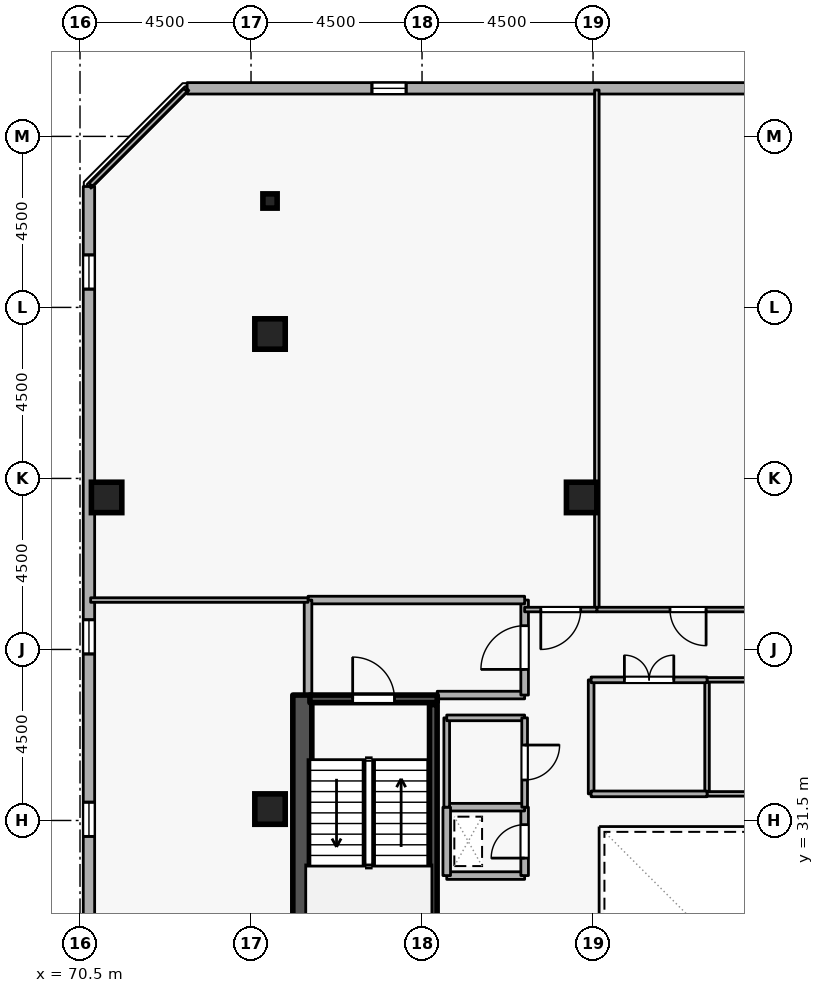
"""IFC4 building model, lengths in metres.
Left out: names, types, materials, properties, quantities, classifications, styles, units other than length and angle.
Written with IfcOpenShell. Run it as: python <this file> out.ifc"""

import sys

from ifc_helpers import new_model, si_unit, direction, frame, frame_2d, origin, origin_2d, place, context, subcontext, project, spatial, rectangle, i_section, extrude, element, fill, save


model = new_model("IFC4")
c1 = context("Model", 3, precision=1e-05, world=origin(), true_north=direction((0.0, 1.0)))
c2 = subcontext(c1, "Body", "Model", "MODEL_VIEW")
j1 = project(units=[si_unit("LENGTHUNIT", "METRE"), si_unit("PLANEANGLEUNIT", "RADIAN")], contexts=[c1])
p1 = place(None, origin())
s1 = spatial("IfcSite", under=j1, at=p1, CompositionType="ELEMENT")
p2 = place(p1, origin())
s2 = spatial("IfcBuilding", under=s1, at=p2, CompositionType="ELEMENT")
p3 = place(p2, frame((0.0, 0.0, 276.3)))
s3 = spatial("IfcBuildingStorey", under=s2, at=p3, CompositionType="ELEMENT", Elevation=276.3)
p4 = place(p3, frame((76.35, 19.2, 0.0), z_axis=(0.0, 0.0, 1.0), x_axis=(0.0, 1.0, 0.0)))
e1 = element("IfcWall", 1, at=p4, inside=s3, PredefinedType="SHEAR", context=c2, shape_type="SweptSolid", body=[
    extrude(rectangle(XDim=15.6, YDim=0.5, at=frame_2d((7.8, 0.0))), origin(), (0.0, 0.0, 1.0), 3.6),
])
for number, where, z_axis, x_axis in (
    (2, (75.5, 44.3, 0.0), (0.0, 0.0, 1.0), (1.0, 0.0, 0.0)),
    (3, (71.2, 40.0, 0.0), (0.0, 0.0, 1.0), (1.0, 0.0, 0.0)),
    (4, (83.7, 40.0, 0.0), (0.0, 0.0, 1.0), (1.0, 0.0, 0.0)),
    (5, (75.5, 31.8, 0.0), (0.0, 0.0, 1.0), (1.0, 0.0, 0.0)),
):
    element("IfcColumn", number, at=place(p3, frame(where, z_axis=z_axis, x_axis=x_axis)), inside=s3, PredefinedType="COLUMN", context=c2, shape_type="SweptSolid", body=[
        extrude(rectangle(XDim=0.8, YDim=0.8, at=origin_2d()), origin(), (0.0, 0.0, 1.0), 3.6),
    ])
p5 = place(p3, frame((75.5, 47.8, 0.0), z_axis=(0.0, 0.0, 1.0), x_axis=(1.0, 0.0, 0.0)))
e6 = element("IfcColumn", 6, at=p5, inside=s3, PredefinedType="COLUMN", context=c2, shape_type="SweptSolid", body=[
    extrude(i_section(OverallWidth=0.375, OverallDepth=0.375, WebThickness=0.017, FlangeThickness=0.027, FilletRadius=0.015, at=origin_2d()), origin(), (0.0, 0.0, 1.0), 3.6),
])
p6 = place(p3, frame((109.681, 50.765, 0.0), z_axis=(0.0, 0.0, 1.0), x_axis=(-1.0, 0.0, 0.0)))
e7 = element("IfcWall", 7, at=p6, inside=s3, PredefinedType="STANDARD", context=c2, shape_type="SweptSolid", body=[
    extrude(rectangle(XDim=36.363, YDim=0.3, at=frame_2d((18.181, 0.0))), origin(), (0.0, 0.0, 1.0), 2.66),
])
p7 = place(p6, frame((1.8, 0.0, 0.72)))
e8 = element("IfcOpeningElement", 8, at=p7, cuts=e7, PredefinedType="OPENING", context=c2, shape_type="SweptSolid", body=[
    extrude(rectangle(XDim=0.9, YDim=1.75, at=frame_2d((0.45, 0.875))), frame((0.0, 0.16, 0.0), z_axis=(0.0, -1.0, 0.0), x_axis=(1.0, 0.0, 0.0)), (0.0, 0.0, 1.0), 0.32),
])
p8 = place(p6, frame((6.6, 0.0, 0.72)))
e9 = element("IfcOpeningElement", 9, at=p8, cuts=e7, PredefinedType="OPENING", context=c2, shape_type="SweptSolid", body=[
    extrude(rectangle(XDim=0.9, YDim=1.75, at=frame_2d((0.45, 0.875))), frame((0.0, 0.16, 0.0), z_axis=(0.0, -1.0, 0.0), x_axis=(1.0, 0.0, 0.0)), (0.0, 0.0, 1.0), 0.32),
])
p9 = place(p6, frame((11.4, 0.0, 0.72)))
e10 = element("IfcOpeningElement", 10, at=p9, cuts=e7, PredefinedType="OPENING", context=c2, shape_type="SweptSolid", body=[
    extrude(rectangle(XDim=0.9, YDim=1.75, at=frame_2d((0.45, 0.875))), frame((0.0, 0.16, 0.0), z_axis=(0.0, -1.0, 0.0), x_axis=(1.0, 0.0, 0.0)), (0.0, 0.0, 1.0), 0.32),
])
p10 = place(p6, frame((16.2, 0.0, 0.72)))
e11 = element("IfcOpeningElement", 11, at=p10, cuts=e7, PredefinedType="OPENING", context=c2, shape_type="SweptSolid", body=[
    extrude(rectangle(XDim=0.9, YDim=1.75, at=frame_2d((0.45, 0.875))), frame((0.0, 0.16, 0.0), z_axis=(0.0, -1.0, 0.0), x_axis=(1.0, 0.0, 0.0)), (0.0, 0.0, 1.0), 0.32),
])
p11 = place(p6, frame((30.6, 0.0, 0.72)))
e12 = element("IfcOpeningElement", 12, at=p11, cuts=e7, PredefinedType="OPENING", context=c2, shape_type="SweptSolid", body=[
    extrude(rectangle(XDim=0.9, YDim=1.75, at=frame_2d((0.45, 0.875))), frame((0.0, 0.16, 0.0), z_axis=(0.0, -1.0, 0.0), x_axis=(1.0, 0.0, 0.0)), (0.0, 0.0, 1.0), 0.32),
])
p12 = place(p3, frame((70.735, 48.181, 0.0), z_axis=(0.0, 0.0, 1.0), x_axis=(0.0, -1.0, 0.0)))
e13 = element("IfcWall", 13, at=p12, inside=s3, PredefinedType="STANDARD", context=c2, shape_type="SweptSolid", body=[
    extrude(rectangle(XDim=36.363, YDim=0.3, at=frame_2d((18.181, 0.0))), origin(), (0.0, 0.0, 1.0), 2.66),
])
p13 = place(p12, frame((1.8, 0.0, 0.72)))
e14 = element("IfcOpeningElement", 14, at=p13, cuts=e13, PredefinedType="OPENING", context=c2, shape_type="SweptSolid", body=[
    extrude(rectangle(XDim=0.9, YDim=1.75, at=frame_2d((0.45, 0.875))), frame((0.0, 0.16, 0.0), z_axis=(0.0, -1.0, 0.0), x_axis=(1.0, 0.0, 0.0)), (0.0, 0.0, 1.0), 0.32),
])
p14 = place(p12, frame((11.4, 0.0, 0.72)))
e15 = element("IfcOpeningElement", 15, at=p14, cuts=e13, PredefinedType="OPENING", context=c2, shape_type="SweptSolid", body=[
    extrude(rectangle(XDim=0.9, YDim=1.75, at=frame_2d((0.45, 0.875))), frame((0.0, 0.16, 0.0), z_axis=(0.0, -1.0, 0.0), x_axis=(1.0, 0.0, 0.0)), (0.0, 0.0, 1.0), 0.32),
])
p15 = place(p12, frame((16.2, 0.0, 0.72)))
e16 = element("IfcOpeningElement", 16, at=p15, cuts=e13, PredefinedType="OPENING", context=c2, shape_type="SweptSolid", body=[
    extrude(rectangle(XDim=0.9, YDim=1.75, at=frame_2d((0.45, 0.875))), frame((0.0, 0.16, 0.0), z_axis=(0.0, -1.0, 0.0), x_axis=(1.0, 0.0, 0.0)), (0.0, 0.0, 1.0), 0.32),
])
p16 = place(p12, frame((25.8, 0.0, 0.72)))
e17 = element("IfcOpeningElement", 17, at=p16, cuts=e13, PredefinedType="OPENING", context=c2, shape_type="SweptSolid", body=[
    extrude(rectangle(XDim=0.9, YDim=1.75, at=frame_2d((0.45, 0.875))), frame((0.0, 0.16, 0.0), z_axis=(0.0, -1.0, 0.0), x_axis=(1.0, 0.0, 0.0)), (0.0, 0.0, 1.0), 0.32),
])
p17 = place(p3, frame((76.55, 34.7, 0.0), z_axis=(0.0, 0.0, 1.0), x_axis=(1.0, 0.0, 0.0)))
e18 = element("IfcWall", 18, at=p17, inside=s3, PredefinedType="SHEAR", context=c2, shape_type="SweptSolid", body=[
    extrude(rectangle(XDim=3.35, YDim=0.2, at=frame_2d((1.675, 0.0))), origin(), (0.0, 0.0, 1.0), 3.6),
])
p18 = place(p17, frame((1.125, 0.0, 0.0)))
e19 = element("IfcOpeningElement", 19, at=p18, cuts=e18, PredefinedType="OPENING", context=c2, shape_type="SweptSolid", body=[
    extrude(rectangle(XDim=1.1, YDim=2.1, at=frame_2d((0.55, 1.05))), frame((0.0, 0.11, 0.0), z_axis=(0.0, -1.0, 0.0), x_axis=(1.0, 0.0, 0.0)), (0.0, 0.0, 1.0), 0.22),
])
p19 = place(p3, frame((79.797, 27.45, 0.0), z_axis=(0.0, 0.0, 1.0), x_axis=(0.0, 1.0, 0.0)))
e20 = element("IfcWall", 20, at=p19, inside=s3, PredefinedType="SHEAR", context=c2, shape_type="SweptSolid", body=[
    extrude(rectangle(XDim=7.1, YDim=0.2, at=frame_2d((3.55, 0.0))), origin(), (0.0, 0.0, 1.0), 3.6),
])
p20 = place(p3, frame((79.9, 34.8, 0.0), z_axis=(0.0, 0.0, 1.0), x_axis=(1.0, 0.0, 0.0)))
e21 = element("IfcWall", 21, at=p20, inside=s3, PredefinedType="STANDARD", context=c2, shape_type="SweptSolid", body=[
    extrude(rectangle(XDim=2.3, YDim=0.2, at=frame_2d((1.15, 0.0))), origin(), (0.0, 0.0, 1.0), 2.465),
])
p21 = place(p3, frame((82.2, 34.8, 0.0), z_axis=(0.0, 0.0, 1.0), x_axis=(0.0, 1.0, 0.0)))
e22 = element("IfcWall", 22, at=p21, inside=s3, PredefinedType="STANDARD", context=c2, shape_type="SweptSolid", body=[
    extrude(rectangle(XDim=2.5, YDim=0.2, at=frame_2d((1.25, 0.0))), origin(), (0.0, 0.0, 1.0), 3.26),
])
p22 = place(p21, frame((0.675, 0.0, 0.0)))
e23 = element("IfcOpeningElement", 23, at=p22, cuts=e22, PredefinedType="OPENING", context=c2, shape_type="SweptSolid", body=[
    extrude(rectangle(XDim=1.15, YDim=2.1, at=frame_2d((0.575, 1.05))), frame((0.0, 0.11, 0.0), z_axis=(0.0, -1.0, 0.0), x_axis=(1.0, 0.0, 0.0)), (0.0, 0.0, 1.0), 0.22),
])
p23 = place(p3, frame((82.2, 37.3, 0.0), z_axis=(0.0, 0.0, 1.0), x_axis=(-1.0, 0.0, 0.0)))
e24 = element("IfcWall", 24, at=p23, inside=s3, PredefinedType="STANDARD", context=c2, shape_type="SweptSolid", body=[
    extrude(rectangle(XDim=5.7, YDim=0.2, at=frame_2d((2.85, 0.0))), origin(), (0.0, 0.0, 1.0), 3.26),
])
p24 = place(p3, frame((76.5, 37.3, 0.0), z_axis=(0.0, 0.0, 1.0), x_axis=(0.0, -1.0, 0.0)))
e25 = element("IfcWall", 25, at=p24, inside=s3, PredefinedType="STANDARD", context=c2, shape_type="SweptSolid", body=[
    extrude(rectangle(XDim=2.5, YDim=0.2, at=frame_2d((1.25, 0.0))), origin(), (0.0, 0.0, 1.0), 3.26),
])
p25 = place(p3, frame((80.15, 30.05, 0.0), z_axis=(0.0, 0.0, 1.0), x_axis=(1.0, 0.0, 0.0)))
e26 = element("IfcWall", 26, at=p25, inside=s3, PredefinedType="STANDARD", context=c2, shape_type="SweptSolid", body=[
    extrude(rectangle(XDim=2.05, YDim=0.2, at=frame_2d((1.025, 0.0))), origin(), (0.0, 0.0, 1.0), 3.26),
])
p26 = place(p3, frame((82.2, 30.05, 0.0), z_axis=(0.0, 0.0, 1.0), x_axis=(0.0, 1.0, 0.0)))
e27 = element("IfcWall", 27, at=p26, inside=s3, PredefinedType="STANDARD", context=c2, shape_type="SweptSolid", body=[
    extrude(rectangle(XDim=1.8, YDim=0.2, at=frame_2d((0.9, 0.0))), origin(), (0.0, 0.0, 1.0), 3.26),
])
p27 = place(p26, frame((0.46, 0.0, 0.0)))
e28 = element("IfcOpeningElement", 28, at=p27, cuts=e27, PredefinedType="OPENING", context=c2, shape_type="SweptSolid", body=[
    extrude(rectangle(XDim=0.88, YDim=2.04, at=frame_2d((0.44, 1.02))), frame((0.0, 0.11, 0.0), z_axis=(0.0, -1.0, 0.0), x_axis=(1.0, 0.0, 0.0)), (0.0, 0.0, 1.0), 0.22),
])
p28 = place(p3, frame((82.2, 31.85, 0.0), z_axis=(0.0, 0.0, 1.0), x_axis=(-1.0, 0.0, 0.0)))
e29 = element("IfcWall", 29, at=p28, inside=s3, PredefinedType="STANDARD", context=c2, shape_type="SweptSolid", body=[
    extrude(rectangle(XDim=2.05, YDim=0.2, at=frame_2d((1.025, 0.0))), origin(), (0.0, 0.0, 1.0), 3.26),
])
p29 = place(p3, frame((80.15, 31.85, 0.0), z_axis=(0.0, 0.0, 1.0), x_axis=(0.0, -1.0, 0.0)))
e30 = element("IfcWall", 30, at=p29, inside=s3, PredefinedType="STANDARD", context=c2, shape_type="SweptSolid", body=[
    extrude(rectangle(XDim=1.8, YDim=0.2, at=frame_2d((0.9, 0.0))), origin(), (0.0, 0.0, 1.0), 3.26),
])
p30 = place(p3, frame((80.15, 31.85, 0.0), z_axis=(0.0, 0.0, 1.0), x_axis=(0.0, 1.0, 0.0)))
e31 = element("IfcWall", 31, at=p30, inside=s3, PredefinedType="PARTITIONING", context=c2, shape_type="SweptSolid", body=[
    extrude(rectangle(XDim=2.35, YDim=0.15, at=frame_2d((1.175, 0.0))), origin(), (0.0, 0.0, 1.0), 3.26),
])
p31 = place(p3, frame((80.15, 34.2, 0.0), z_axis=(0.0, 0.0, 1.0), x_axis=(1.0, 0.0, 0.0)))
e32 = element("IfcWall", 32, at=p31, inside=s3, PredefinedType="PARTITIONING", context=c2, shape_type="SweptSolid", body=[
    extrude(rectangle(XDim=2.05, YDim=0.15, at=frame_2d((1.025, 0.0))), origin(), (0.0, 0.0, 1.0), 2.465),
])
p32 = place(p3, frame((82.2, 34.2, 0.0), z_axis=(0.0, 0.0, 1.0), x_axis=(0.0, -1.0, 0.0)))
e33 = element("IfcWall", 33, at=p32, inside=s3, PredefinedType="PARTITIONING", context=c2, shape_type="SweptSolid", body=[
    extrude(rectangle(XDim=2.35, YDim=0.15, at=frame_2d((1.175, 0.0))), origin(), (0.0, 0.0, 1.0), 3.26),
])
p33 = place(p32, frame((0.715, 0.0, 0.0)))
e34 = element("IfcOpeningElement", 34, at=p33, cuts=e33, PredefinedType="OPENING", context=c2, shape_type="SweptSolid", body=[
    extrude(rectangle(XDim=0.92, YDim=2.08, at=frame_2d((0.46, 1.04))), frame((0.0, 0.085, 0.0), z_axis=(0.0, -1.0, 0.0), x_axis=(1.0, 0.0, 0.0)), (0.0, 0.0, 1.0), 0.17),
])
p34 = place(p3, frame((84.1, 37.05, 0.0), z_axis=(0.0, 0.0, 1.0), x_axis=(0.0, 1.0, 0.0)))
e35 = element("IfcWall", 35, at=p34, inside=s3, PredefinedType="PARTITIONING", context=c2, shape_type="SweptSolid", body=[
    extrude(rectangle(XDim=13.67, YDim=0.12, at=frame_2d((6.835, 0.0))), origin(), (0.0, 0.0, 1.0), 3.26),
])
p35 = place(p3, frame((88.9, 37.05, 0.0), z_axis=(0.0, 0.0, 1.0), x_axis=(-1.0, 0.0, 0.0)))
e36 = element("IfcWall", 36, at=p35, inside=s3, PredefinedType="PARTITIONING", context=c2, shape_type="SweptSolid", body=[
    extrude(rectangle(XDim=4.8, YDim=0.12, at=frame_2d((2.4, 0.0))), origin(), (0.0, 0.0, 1.0), 3.26),
])
p36 = place(p35, frame((1.925, 0.0, 0.0)))
e37 = element("IfcOpeningElement", 37, at=p36, cuts=e36, PredefinedType="OPENING", context=c2, shape_type="SweptSolid", body=[
    extrude(rectangle(XDim=0.95, YDim=2.1, at=frame_2d((0.475, 1.05))), frame((0.0, 0.07, 0.0), z_axis=(0.0, -1.0, 0.0), x_axis=(1.0, 0.0, 0.0)), (0.0, 0.0, 1.0), 0.14),
])
p37 = place(p3, frame((76.5, 37.3, 0.0), z_axis=(0.0, 0.0, 1.0), x_axis=(-1.0, 0.0, 0.0)))
e38 = element("IfcWall", 38, at=p37, inside=s3, PredefinedType="PARTITIONING", context=c2, shape_type="SweptSolid", body=[
    extrude(rectangle(XDim=5.72, YDim=0.12, at=frame_2d((2.86, 0.0))), origin(), (0.0, 0.0, 1.0), 3.26),
])
p38 = place(p3, frame((70.78, 48.225, 0.0), z_axis=(0.0, 0.0, 1.0), x_axis=(0.707106781187, 0.707106781187, 0.0)))
e39 = element("IfcWall", 39, at=p38, inside=s3, PredefinedType="PARTITIONING", context=c2, shape_type="SweptSolid", body=[
    extrude(rectangle(XDim=3.528, YDim=0.12, at=frame_2d((1.764, 0.0))), origin(), (0.0, 0.0, 1.0), 3.26),
])
p39 = place(p3, frame((84.1, 37.05, 0.0), z_axis=(0.0, 0.0, 1.0), x_axis=(-1.0, 0.0, 0.0)))
e40 = element("IfcWall", 40, at=p39, inside=s3, PredefinedType="PARTITIONING", context=c2, shape_type="SweptSolid", body=[
    extrude(rectangle(XDim=1.9, YDim=0.12, at=frame_2d((0.95, 0.0))), origin(), (0.0, 0.0, 1.0), 3.26),
])
p40 = place(p39, frame((0.425, 0.0, 0.0)))
e41 = element("IfcOpeningElement", 41, at=p40, cuts=e40, PredefinedType="OPENING", context=c2, shape_type="SweptSolid", body=[
    extrude(rectangle(XDim=1.05, YDim=2.1, at=frame_2d((0.525, 1.05))), frame((0.0, 0.07, 0.0), z_axis=(0.0, -1.0, 0.0), x_axis=(1.0, 0.0, 0.0)), (0.0, 0.0, 1.0), 0.14),
])
p41 = place(p3, frame((87.0, 32.2, 0.0), z_axis=(0.0, 0.0, 1.0), x_axis=(0.0, 1.0, 0.0)))
e42 = element("IfcWall", 42, at=p41, inside=s3, PredefinedType="PARTITIONING", context=c2, shape_type="SweptSolid", body=[
    extrude(rectangle(XDim=3.0, YDim=0.12, at=frame_2d((1.5, 0.0))), origin(), (0.0, 0.0, 1.0), 3.26),
])
p42 = place(p3, frame((87.0, 35.2, 0.0), z_axis=(0.0, 0.0, 1.0), x_axis=(1.0, 0.0, 0.0)))
e43 = element("IfcWall", 43, at=p42, inside=s3, PredefinedType="PARTITIONING", context=c2, shape_type="SweptSolid", body=[
    extrude(rectangle(XDim=3.0, YDim=0.12, at=frame_2d((1.5, 0.0))), origin(), (0.0, 0.0, 1.0), 3.26),
])
p43 = place(p42, frame((1.025, 0.0, 0.0)))
e44 = element("IfcOpeningElement", 44, at=p43, cuts=e43, PredefinedType="OPENING", context=c2, shape_type="SweptSolid", body=[
    extrude(rectangle(XDim=0.95, YDim=2.1, at=frame_2d((0.475, 1.05))), frame((0.0, 0.07, 0.0), z_axis=(0.0, -1.0, 0.0), x_axis=(1.0, 0.0, 0.0)), (0.0, 0.0, 1.0), 0.14),
])
p44 = place(p3, frame((90.0, 32.2, 0.0), z_axis=(0.0, 0.0, 1.0), x_axis=(-1.0, 0.0, 0.0)))
e45 = element("IfcWall", 45, at=p44, inside=s3, PredefinedType="PARTITIONING", context=c2, shape_type="SweptSolid", body=[
    extrude(rectangle(XDim=3.0, YDim=0.12, at=frame_2d((1.5, 0.0))), origin(), (0.0, 0.0, 1.0), 3.26),
])
p45 = place(p3, frame((83.95, 32.2, 0.0), z_axis=(0.0, 0.0, 1.0), x_axis=(0.0, 1.0, 0.0)))
e46 = element("IfcWall", 46, at=p45, inside=s3, PredefinedType="PARTITIONING", context=c2, shape_type="SweptSolid", body=[
    extrude(rectangle(XDim=3.0, YDim=0.15, at=frame_2d((1.5, 0.0))), origin(), (0.0, 0.0, 1.0), 3.26),
])
p46 = place(p3, frame((83.95, 35.2, 0.0), z_axis=(0.0, 0.0, 1.0), x_axis=(1.0, 0.0, 0.0)))
e47 = element("IfcWall", 47, at=p46, inside=s3, PredefinedType="PARTITIONING", context=c2, shape_type="SweptSolid", body=[
    extrude(rectangle(XDim=3.05, YDim=0.15, at=frame_2d((1.525, 0.0))), origin(), (0.0, 0.0, 1.0), 3.26),
])
p47 = place(p46, frame((0.875, 0.0, 0.0)))
e48 = element("IfcOpeningElement", 48, at=p47, cuts=e47, PredefinedType="OPENING", context=c2, shape_type="SweptSolid", body=[
    extrude(rectangle(XDim=1.3, YDim=2.12, at=frame_2d((0.65, 1.06))), frame((0.0, 0.085, 0.0), z_axis=(0.0, -1.0, 0.0), x_axis=(1.0, 0.0, 0.0)), (0.0, 0.0, 1.0), 0.17),
])
p48 = place(p3, frame((87.0, 32.2, 0.0), z_axis=(0.0, 0.0, 1.0), x_axis=(-1.0, 0.0, 0.0)))
e49 = element("IfcWall", 49, at=p48, inside=s3, PredefinedType="PARTITIONING", context=c2, shape_type="SweptSolid", body=[
    extrude(rectangle(XDim=3.05, YDim=0.15, at=frame_2d((1.525, 0.0))), origin(), (0.0, 0.0, 1.0), 3.26),
])
p49 = place(p11, origin())
e50 = element("IfcWindow", 50, at=p49, inside=s3, PartitioningType="SINGLE_PANEL", PredefinedType="WINDOW", context=c2, shape_type="SweptSolid", body=[
    extrude(rectangle(XDim=0.9, YDim=1.75, at=frame_2d((0.45, 0.875))), frame((0.0, 0.03, 0.0), z_axis=(0.0, -1.0, 0.0), x_axis=(1.0, 0.0, 0.0)), (0.0, 0.0, 1.0), 0.06),
])
fill(e12, e50)
p50 = place(p13, origin())
e51 = element("IfcWindow", 51, at=p50, inside=s3, PartitioningType="SINGLE_PANEL", PredefinedType="WINDOW", context=c2, shape_type="SweptSolid", body=[
    extrude(rectangle(XDim=0.9, YDim=1.75, at=frame_2d((0.45, 0.875))), frame((0.0, 0.03, 0.0), z_axis=(0.0, -1.0, 0.0), x_axis=(1.0, 0.0, 0.0)), (0.0, 0.0, 1.0), 0.06),
])
fill(e14, e51)
p51 = place(p14, origin())
e52 = element("IfcWindow", 52, at=p51, inside=s3, PartitioningType="SINGLE_PANEL", PredefinedType="WINDOW", context=c2, shape_type="SweptSolid", body=[
    extrude(rectangle(XDim=0.9, YDim=1.75, at=frame_2d((0.45, 0.875))), frame((0.0, 0.03, 0.0), z_axis=(0.0, -1.0, 0.0), x_axis=(1.0, 0.0, 0.0)), (0.0, 0.0, 1.0), 0.06),
])
fill(e15, e52)
p52 = place(p15, origin())
e53 = element("IfcWindow", 53, at=p52, inside=s3, PartitioningType="SINGLE_PANEL", PredefinedType="WINDOW", context=c2, shape_type="SweptSolid", body=[
    extrude(rectangle(XDim=0.9, YDim=1.75, at=frame_2d((0.45, 0.875))), frame((0.0, 0.03, 0.0), z_axis=(0.0, -1.0, 0.0), x_axis=(1.0, 0.0, 0.0)), (0.0, 0.0, 1.0), 0.06),
])
fill(e16, e53)
p53 = place(p18, origin())
e54 = element("IfcDoor", 54, at=p53, inside=s3, OperationType="SINGLE_SWING_LEFT", PredefinedType="DOOR", context=c2, shape_type="SweptSolid", body=[
    extrude(rectangle(XDim=1.1, YDim=2.1, at=frame_2d((0.55, 1.05))), frame((0.0, 0.025, 0.0), z_axis=(0.0, -1.0, 0.0), x_axis=(1.0, 0.0, 0.0)), (0.0, 0.0, 1.0), 0.05),
])
fill(e19, e54)
p54 = place(p22, origin())
e55 = element("IfcDoor", 55, at=p54, inside=s3, OperationType="SINGLE_SWING_LEFT", PredefinedType="DOOR", context=c2, shape_type="SweptSolid", body=[
    extrude(rectangle(XDim=1.15, YDim=2.1, at=frame_2d((0.575, 1.05))), frame((0.0, 0.025, 0.0), z_axis=(0.0, -1.0, 0.0), x_axis=(1.0, 0.0, 0.0)), (0.0, 0.0, 1.0), 0.05),
])
fill(e23, e55)
p55 = place(p27, origin())
e56 = element("IfcDoor", 56, at=p55, inside=s3, OperationType="SINGLE_SWING_LEFT", PredefinedType="DOOR", context=c2, shape_type="SweptSolid", body=[
    extrude(rectangle(XDim=0.88, YDim=2.04, at=frame_2d((0.44, 1.02))), frame((0.0, 0.025, 0.0), z_axis=(0.0, -1.0, 0.0), x_axis=(1.0, 0.0, 0.0)), (0.0, 0.0, 1.0), 0.05),
])
fill(e28, e56)
p56 = place(p33, origin())
e57 = element("IfcDoor", 57, at=p56, inside=s3, OperationType="SINGLE_SWING_LEFT", PredefinedType="DOOR", context=c2, shape_type="SweptSolid", body=[
    extrude(rectangle(XDim=0.92, YDim=2.08, at=frame_2d((0.46, 1.04))), frame((0.0, 0.025, 0.0), z_axis=(0.0, -1.0, 0.0), x_axis=(1.0, 0.0, 0.0)), (0.0, 0.0, 1.0), 0.05),
])
fill(e34, e57)
p57 = place(p36, origin())
e58 = element("IfcDoor", 58, at=p57, inside=s3, OperationType="SINGLE_SWING_LEFT", PredefinedType="DOOR", context=c2, shape_type="SweptSolid", body=[
    extrude(rectangle(XDim=0.95, YDim=2.1, at=frame_2d((0.475, 1.05))), frame((0.0, 0.025, 0.0), z_axis=(0.0, -1.0, 0.0), x_axis=(1.0, 0.0, 0.0)), (0.0, 0.0, 1.0), 0.05),
])
fill(e37, e58)
p58 = place(p40, origin())
e59 = element("IfcDoor", 59, at=p58, inside=s3, OperationType="SINGLE_SWING_RIGHT", PredefinedType="DOOR", context=c2, shape_type="SweptSolid", body=[
    extrude(rectangle(XDim=1.05, YDim=2.1, at=frame_2d((0.525, 1.05))), frame((0.0, 0.025, 0.0), z_axis=(0.0, -1.0, 0.0), x_axis=(1.0, 0.0, 0.0)), (0.0, 0.0, 1.0), 0.05),
])
fill(e41, e59)
p59 = place(p47, origin())
e60 = element("IfcDoor", 60, at=p59, inside=s3, OperationType="DOUBLE_DOOR_SINGLE_SWING", PredefinedType="DOOR", context=c2, shape_type="SweptSolid", body=[
    extrude(rectangle(XDim=1.3, YDim=2.12, at=frame_2d((0.65, 1.06))), frame((0.0, 0.025, 0.0), z_axis=(0.0, -1.0, 0.0), x_axis=(1.0, 0.0, 0.0)), (0.0, 0.0, 1.0), 0.05),
])
fill(e48, e60)
save(model, sys.argv[1])
